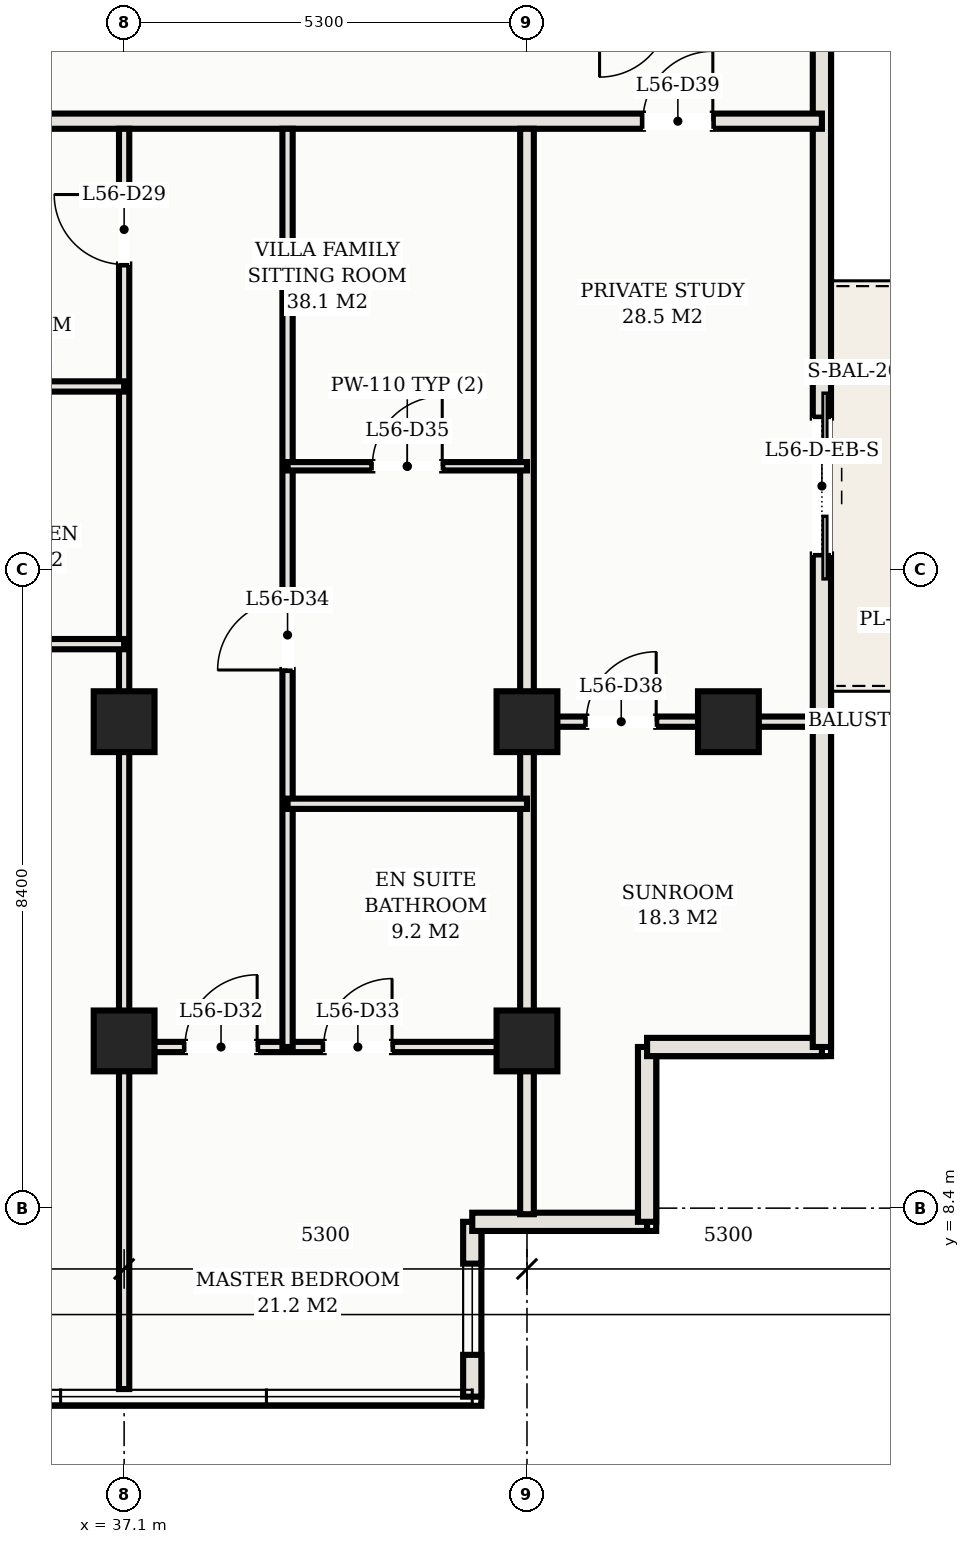
"""IFC4 building model, lengths in metres.
Left out: names, types, materials, properties, quantities, classifications, styles, units other than length and angle.
Written with IfcOpenShell. Run it as: python <this file> out.ifc"""

import sys

from ifc_helpers import new_model, si_unit, direction, frame, frame_2d, origin, origin_2d, place, context, subcontext, project, spatial, rectangle, hollow_rectangle, extrude, element, fill, save


model = new_model("IFC4")
c1 = context("Model", 3, precision=1e-05, world=origin(), true_north=direction((0.0, 1.0)))
c2 = subcontext(c1, "Body", "Model", "MODEL_VIEW")
j1 = project(units=[si_unit("LENGTHUNIT", "METRE"), si_unit("PLANEANGLEUNIT", "RADIAN")], contexts=[c1])
p1 = place(None, origin())
s1 = spatial("IfcSite", under=j1, at=p1, CompositionType="ELEMENT")
p2 = place(p1, origin())
s2 = spatial("IfcBuilding", under=s1, at=p2, CompositionType="ELEMENT")
p3 = place(p2, frame((0.0, 0.0, 206.6)))
s3 = spatial("IfcBuildingStorey", under=s2, at=p3, CompositionType="ELEMENT", Elevation=206.6)
for number, where, z_axis, x_axis in (
    (1, (37.1, 14.8, 0.0), (0.0, 0.0, 1.0), (1.0, 0.0, 0.0)),
    (2, (37.1, 10.6, 0.0), (0.0, 0.0, 1.0), (1.0, 0.0, 0.0)),
    (3, (42.4, 14.8, 0.0), (0.0, 0.0, 1.0), (1.0, 0.0, 0.0)),
    (4, (42.4, 10.6, 0.0), (0.0, 0.0, 1.0), (1.0, 0.0, 0.0)),
    (5, (45.05, 14.8, 0.0), (0.0, 0.0, 1.0), (1.0, 0.0, 0.0)),
):
    element("IfcColumn", number, at=place(p3, frame(where, z_axis=z_axis, x_axis=x_axis)), inside=s3, PredefinedType="COLUMN", context=c2, shape_type="SweptSolid", body=[
        extrude(hollow_rectangle(XDim=0.8, YDim=0.8, WallThickness=0.028, at=origin_2d()), origin(), (0.0, 0.0, 1.0), 3.3),
    ])
p4 = place(p3, frame((41.68, 5.92, 0.0), z_axis=(0.0, 0.0, 1.0), x_axis=(0.0, 1.0, 0.0)))
e6 = element("IfcWall", 6, at=p4, inside=s3, PredefinedType="SOLIDWALL", context=c2, shape_type="SweptSolid", body=[
    extrude(rectangle(XDim=2.3, YDim=0.24, at=frame_2d((1.15, 0.0))), origin(), (0.0, 0.0, 1.0), 3.11),
])
p5 = place(p4, frame((0.55, 0.0, 0.75)))
e7 = element("IfcOpeningElement", 7, at=p5, cuts=e6, PredefinedType="OPENING", context=c2, shape_type="SweptSolid", body=[
    extrude(rectangle(XDim=1.2, YDim=1.5, at=frame_2d((0.6, 0.75))), frame((0.0, 0.13, 0.0), z_axis=(0.0, -1.0, 0.0), x_axis=(1.0, 0.0, 0.0)), (0.0, 0.0, 1.0), 0.26),
])
for number, where, z_axis, x_axis in (
    (8, (41.68, 8.22, 0.0), (0.0, 0.0, 1.0), (1.0, 0.0, 0.0)),
    (9, (43.98, 8.22, 0.0), (0.0, 0.0, 1.0), (0.0, 1.0, 0.0)),
    (10, (43.98, 10.52, 0.0), (0.0, 0.0, 1.0), (1.0, 0.0, 0.0)),
):
    element("IfcWall", number, at=place(p3, frame(where, z_axis=z_axis, x_axis=x_axis)), inside=s3, PredefinedType="SOLIDWALL", context=c2, shape_type="SweptSolid", body=[
        extrude(rectangle(XDim=2.3, YDim=0.24, at=frame_2d((1.15, 0.0))), origin(), (0.0, 0.0, 1.0), 3.11),
    ])
p6 = place(p3, frame((46.28, 10.52, 0.0), z_axis=(0.0, 0.0, 1.0), x_axis=(0.0, 1.0, 0.0)))
e11 = element("IfcWall", 11, at=p6, inside=s3, PredefinedType="SOLIDWALL", context=c2, shape_type="SweptSolid", body=[
    extrude(rectangle(XDim=26.41, YDim=0.24, at=frame_2d((13.205, 0.0))), origin(), (0.0, 0.0, 1.0), 3.11),
])
p7 = place(p6, frame((6.48, 0.0, 0.0)))
e12 = element("IfcOpeningElement", 12, at=p7, cuts=e11, PredefinedType="OPENING", context=c2, shape_type="SweptSolid", body=[
    extrude(rectangle(XDim=1.8, YDim=2.2, at=frame_2d((0.9, 1.1))), frame((0.0, 0.13, 0.0), z_axis=(0.0, -1.0, 0.0), x_axis=(1.0, 0.0, 0.0)), (0.0, 0.0, 1.0), 0.26),
])
p8 = place(p3, frame((6.72, 22.7, 0.0), z_axis=(0.0, 0.0, 1.0), x_axis=(1.0, 0.0, 0.0)))
e13 = element("IfcWall", 13, at=p8, inside=s3, PredefinedType="PARTITIONING", context=c2, shape_type="SweptSolid", body=[
    extrude(rectangle(XDim=39.56, YDim=0.2, at=frame_2d((19.78, 0.0))), origin(), (0.0, 0.0, 1.0), 2.43),
])
p9 = place(p8, frame((4.63, 0.0, 0.0)))
e14 = element("IfcOpeningElement", 14, at=p9, cuts=e13, PredefinedType="OPENING", context=c2, shape_type="SweptSolid", body=[
    extrude(rectangle(XDim=1.1, YDim=2.25, at=frame_2d((0.55, 1.125))), frame((0.0, 0.11, 0.0), z_axis=(0.0, -1.0, 0.0), x_axis=(1.0, 0.0, 0.0)), (0.0, 0.0, 1.0), 0.22),
])
p10 = place(p8, frame((9.93, 0.0, 0.0)))
e15 = element("IfcOpeningElement", 15, at=p10, cuts=e13, PredefinedType="OPENING", context=c2, shape_type="SweptSolid", body=[
    extrude(rectangle(XDim=1.1, YDim=2.25, at=frame_2d((0.55, 1.125))), frame((0.0, 0.11, 0.0), z_axis=(0.0, -1.0, 0.0), x_axis=(1.0, 0.0, 0.0)), (0.0, 0.0, 1.0), 0.22),
])
p11 = place(p8, frame((25.83, 0.0, 0.0)))
e16 = element("IfcOpeningElement", 16, at=p11, cuts=e13, PredefinedType="OPENING", context=c2, shape_type="SweptSolid", body=[
    extrude(rectangle(XDim=1.1, YDim=2.25, at=frame_2d((0.55, 1.125))), frame((0.0, 0.11, 0.0), z_axis=(0.0, -1.0, 0.0), x_axis=(1.0, 0.0, 0.0)), (0.0, 0.0, 1.0), 0.22),
])
p12 = place(p8, frame((1.435, 0.0, 0.0)))
e17 = element("IfcOpeningElement", 17, at=p12, cuts=e13, PredefinedType="OPENING", context=c2, shape_type="SweptSolid", body=[
    extrude(rectangle(XDim=0.92, YDim=2.15, at=frame_2d((0.46, 1.075))), frame((0.0, 0.11, 0.0), z_axis=(0.0, -1.0, 0.0), x_axis=(1.0, 0.0, 0.0)), (0.0, 0.0, 1.0), 0.22),
])
p13 = place(p8, frame((37.205, 0.0, 0.0)))
e18 = element("IfcOpeningElement", 18, at=p13, cuts=e13, PredefinedType="OPENING", context=c2, shape_type="SweptSolid", body=[
    extrude(rectangle(XDim=0.92, YDim=2.15, at=frame_2d((0.46, 1.075))), frame((0.0, 0.11, 0.0), z_axis=(0.0, -1.0, 0.0), x_axis=(1.0, 0.0, 0.0)), (0.0, 0.0, 1.0), 0.22),
])
p14 = place(p3, frame((42.4, 8.32, 0.0), z_axis=(0.0, 0.0, 1.0), x_axis=(0.0, 1.0, 0.0)))
e19 = element("IfcWall", 19, at=p14, inside=s3, PredefinedType="PARTITIONING", context=c2, shape_type="SweptSolid", body=[
    extrude(rectangle(XDim=14.28, YDim=0.18, at=frame_2d((7.14, 0.0))), origin(), (0.0, 0.0, 1.0), 2.43),
])
p15 = place(p3, frame((37.1, 6.02, 0.0), z_axis=(0.0, 0.0, 1.0), x_axis=(0.0, 1.0, 0.0)))
e20 = element("IfcWall", 20, at=p15, inside=s3, PredefinedType="PARTITIONING", context=c2, shape_type="SweptSolid", body=[
    extrude(rectangle(XDim=16.58, YDim=0.135, at=frame_2d((8.29, 0.0))), origin(), (0.0, 0.0, 1.0), 2.43),
])
p16 = place(p15, frame((14.795, 0.0, 0.0)))
e21 = element("IfcOpeningElement", 21, at=p16, cuts=e20, PredefinedType="OPENING", context=c2, shape_type="SweptSolid", body=[
    extrude(rectangle(XDim=0.92, YDim=2.15, at=frame_2d((0.46, 1.075))), frame((0.0, 0.078, 0.0), z_axis=(0.0, -1.0, 0.0), x_axis=(1.0, 0.0, 0.0)), (0.0, 0.0, 1.0), 0.155),
])
for number, where, z_axis, x_axis in (
    (22, (33.95, 15.82, 0.0), (0.0, 0.0, 1.0), (1.0, 0.0, 0.0)),
    (23, (33.95, 19.21, 0.0), (0.0, 0.0, 1.0), (1.0, 0.0, 0.0)),
):
    element("IfcWall", number, at=place(p3, frame(where, z_axis=z_axis, x_axis=x_axis)), inside=s3, PredefinedType="PARTITIONING", context=c2, shape_type="SweptSolid", body=[
        extrude(rectangle(XDim=3.15, YDim=0.135, at=frame_2d((1.575, 0.0))), origin(), (0.0, 0.0, 1.0), 2.43),
    ])
p17 = place(p3, frame((37.1, 10.52, 0.0), z_axis=(0.0, 0.0, 1.0), x_axis=(1.0, 0.0, 0.0)))
e24 = element("IfcWall", 24, at=p17, inside=s3, PredefinedType="PARTITIONING", context=c2, shape_type="SweptSolid", body=[
    extrude(rectangle(XDim=5.3, YDim=0.135, at=frame_2d((2.65, 0.0))), origin(), (0.0, 0.0, 1.0), 2.43),
])
p18 = place(p17, frame((0.8, 0.0, 0.0)))
e25 = element("IfcOpeningElement", 25, at=p18, cuts=e24, PredefinedType="OPENING", context=c2, shape_type="SweptSolid", body=[
    extrude(rectangle(XDim=0.95, YDim=2.15, at=frame_2d((0.475, 1.075))), frame((0.0, 0.078, 0.0), z_axis=(0.0, -1.0, 0.0), x_axis=(1.0, 0.0, 0.0)), (0.0, 0.0, 1.0), 0.155),
])
p19 = place(p17, frame((2.625, 0.0, 0.0)))
e26 = element("IfcOpeningElement", 26, at=p19, cuts=e24, PredefinedType="OPENING", context=c2, shape_type="SweptSolid", body=[
    extrude(rectangle(XDim=0.9, YDim=2.15, at=frame_2d((0.45, 1.075))), frame((0.0, 0.078, 0.0), z_axis=(0.0, -1.0, 0.0), x_axis=(1.0, 0.0, 0.0)), (0.0, 0.0, 1.0), 0.155),
])
p20 = place(p3, frame((39.25, 10.52, 0.0), z_axis=(0.0, 0.0, 1.0), x_axis=(0.0, 1.0, 0.0)))
e27 = element("IfcWall", 27, at=p20, inside=s3, PredefinedType="PARTITIONING", context=c2, shape_type="SweptSolid", body=[
    extrude(rectangle(XDim=12.08, YDim=0.135, at=frame_2d((6.04, 0.0))), origin(), (0.0, 0.0, 1.0), 2.43),
])
p21 = place(p20, frame((4.96, 0.0, 0.0)))
e28 = element("IfcOpeningElement", 28, at=p21, cuts=e27, PredefinedType="OPENING", context=c2, shape_type="SweptSolid", body=[
    extrude(rectangle(XDim=0.92, YDim=2.15, at=frame_2d((0.46, 1.075))), frame((0.0, 0.078, 0.0), z_axis=(0.0, -1.0, 0.0), x_axis=(1.0, 0.0, 0.0)), (0.0, 0.0, 1.0), 0.155),
])
p22 = place(p3, frame((39.25, 13.72, 0.0), z_axis=(0.0, 0.0, 1.0), x_axis=(1.0, 0.0, 0.0)))
e29 = element("IfcWall", 29, at=p22, inside=s3, PredefinedType="PARTITIONING", context=c2, shape_type="SweptSolid", body=[
    extrude(rectangle(XDim=3.15, YDim=0.135, at=frame_2d((1.575, 0.0))), origin(), (0.0, 0.0, 1.0), 2.43),
])
p23 = place(p3, frame((39.25, 18.16, 0.0), z_axis=(0.0, 0.0, 1.0), x_axis=(1.0, 0.0, 0.0)))
e30 = element("IfcWall", 30, at=p23, inside=s3, PredefinedType="MOVABLE", context=c2, shape_type="SweptSolid", body=[
    extrude(rectangle(XDim=3.15, YDim=0.11, at=frame_2d((1.575, 0.0))), origin(), (0.0, 0.0, 1.0), 2.43),
])
p24 = place(p23, frame((1.115, 0.0, 0.0)))
e31 = element("IfcOpeningElement", 31, at=p24, cuts=e30, PredefinedType="OPENING", context=c2, shape_type="SweptSolid", body=[
    extrude(rectangle(XDim=0.92, YDim=2.15, at=frame_2d((0.46, 1.075))), frame((0.0, 0.065, 0.0), z_axis=(0.0, -1.0, 0.0), x_axis=(1.0, 0.0, 0.0)), (0.0, 0.0, 1.0), 0.13),
])
p25 = place(p3, frame((42.4, 14.8, 0.0), z_axis=(0.0, 0.0, 1.0), x_axis=(1.0, 0.0, 0.0)))
e32 = element("IfcWall", 32, at=p25, inside=s3, PredefinedType="PARTITIONING", context=c2, shape_type="SweptSolid", body=[
    extrude(rectangle(XDim=3.78, YDim=0.135, at=frame_2d((1.89, 0.0))), origin(), (0.0, 0.0, 1.0), 2.43),
])
p26 = place(p25, frame((0.78, 0.0, 0.0)))
e33 = element("IfcOpeningElement", 33, at=p26, cuts=e32, PredefinedType="OPENING", context=c2, shape_type="SweptSolid", body=[
    extrude(rectangle(XDim=0.92, YDim=2.15, at=frame_2d((0.46, 1.075))), frame((0.0, 0.078, 0.0), z_axis=(0.0, -1.0, 0.0), x_axis=(1.0, 0.0, 0.0)), (0.0, 0.0, 1.0), 0.155),
])
p27 = place(p5, origin())
e34 = element("IfcWindow", 34, at=p27, inside=s3, PartitioningType="SINGLE_PANEL", PredefinedType="WINDOW", context=c2, shape_type="SweptSolid", body=[
    extrude(rectangle(XDim=1.2, YDim=1.5, at=frame_2d((0.6, 0.75))), frame((0.0, 0.03, 0.0), z_axis=(0.0, -1.0, 0.0), x_axis=(1.0, 0.0, 0.0)), (0.0, 0.0, 1.0), 0.06),
])
fill(e7, e34)
p28 = place(p7, frame((1.8, 0.0, 0.0), z_axis=(0.0, 0.0, 1.0), x_axis=(-1.0, 0.0, 0.0)))
e35 = element("IfcDoor", 35, at=p28, inside=s3, OperationType="DOUBLE_DOOR_SLIDING", PredefinedType="DOOR", context=c2, shape_type="SweptSolid", body=[
    extrude(rectangle(XDim=1.8, YDim=2.2, at=frame_2d((0.9, 1.1))), frame((0.0, 0.025, 0.0), z_axis=(0.0, -1.0, 0.0), x_axis=(1.0, 0.0, 0.0)), (0.0, 0.0, 1.0), 0.05),
])
fill(e12, e35)
p29 = place(p16, origin())
e36 = element("IfcDoor", 36, at=p29, inside=s3, OperationType="SINGLE_SWING_RIGHT", PredefinedType="DOOR", context=c2, shape_type="SweptSolid", body=[
    extrude(rectangle(XDim=0.92, YDim=2.15, at=frame_2d((0.46, 1.075))), frame((0.0, 0.025, 0.0), z_axis=(0.0, -1.0, 0.0), x_axis=(1.0, 0.0, 0.0)), (0.0, 0.0, 1.0), 0.05),
])
fill(e21, e36)
p30 = place(p18, origin())
e37 = element("IfcDoor", 37, at=p30, inside=s3, OperationType="SINGLE_SWING_RIGHT", PredefinedType="DOOR", context=c2, shape_type="SweptSolid", body=[
    extrude(rectangle(XDim=0.95, YDim=2.15, at=frame_2d((0.475, 1.075))), frame((0.0, 0.025, 0.0), z_axis=(0.0, -1.0, 0.0), x_axis=(1.0, 0.0, 0.0)), (0.0, 0.0, 1.0), 0.05),
])
fill(e25, e37)
p31 = place(p19, origin())
e38 = element("IfcDoor", 38, at=p31, inside=s3, OperationType="SINGLE_SWING_RIGHT", PredefinedType="DOOR", context=c2, shape_type="SweptSolid", body=[
    extrude(rectangle(XDim=0.9, YDim=2.15, at=frame_2d((0.45, 1.075))), frame((0.0, 0.025, 0.0), z_axis=(0.0, -1.0, 0.0), x_axis=(1.0, 0.0, 0.0)), (0.0, 0.0, 1.0), 0.05),
])
fill(e26, e38)
p32 = place(p21, origin())
e39 = element("IfcDoor", 39, at=p32, inside=s3, OperationType="SINGLE_SWING_LEFT", PredefinedType="DOOR", context=c2, shape_type="SweptSolid", body=[
    extrude(rectangle(XDim=0.92, YDim=2.15, at=frame_2d((0.46, 1.075))), frame((0.0, 0.025, 0.0), z_axis=(0.0, -1.0, 0.0), x_axis=(1.0, 0.0, 0.0)), (0.0, 0.0, 1.0), 0.05),
])
fill(e28, e39)
p33 = place(p24, origin())
e40 = element("IfcDoor", 40, at=p33, inside=s3, OperationType="SINGLE_SWING_RIGHT", PredefinedType="DOOR", context=c2, shape_type="SweptSolid", body=[
    extrude(rectangle(XDim=0.92, YDim=2.15, at=frame_2d((0.46, 1.075))), frame((0.0, 0.025, 0.0), z_axis=(0.0, -1.0, 0.0), x_axis=(1.0, 0.0, 0.0)), (0.0, 0.0, 1.0), 0.05),
])
fill(e31, e40)
p34 = place(p26, origin())
e41 = element("IfcDoor", 41, at=p34, inside=s3, OperationType="SINGLE_SWING_RIGHT", PredefinedType="DOOR", context=c2, shape_type="SweptSolid", body=[
    extrude(rectangle(XDim=0.92, YDim=2.15, at=frame_2d((0.46, 1.075))), frame((0.0, 0.025, 0.0), z_axis=(0.0, -1.0, 0.0), x_axis=(1.0, 0.0, 0.0)), (0.0, 0.0, 1.0), 0.05),
])
fill(e33, e41)
p35 = place(p13, origin())
e42 = element("IfcDoor", 42, at=p35, inside=s3, OperationType="SINGLE_SWING_RIGHT", PredefinedType="DOOR", context=c2, shape_type="SweptSolid", body=[
    extrude(rectangle(XDim=0.92, YDim=2.15, at=frame_2d((0.46, 1.075))), frame((0.0, 0.025, 0.0), z_axis=(0.0, -1.0, 0.0), x_axis=(1.0, 0.0, 0.0)), (0.0, 0.0, 1.0), 0.05),
])
fill(e18, e42)
save(model, sys.argv[1])
